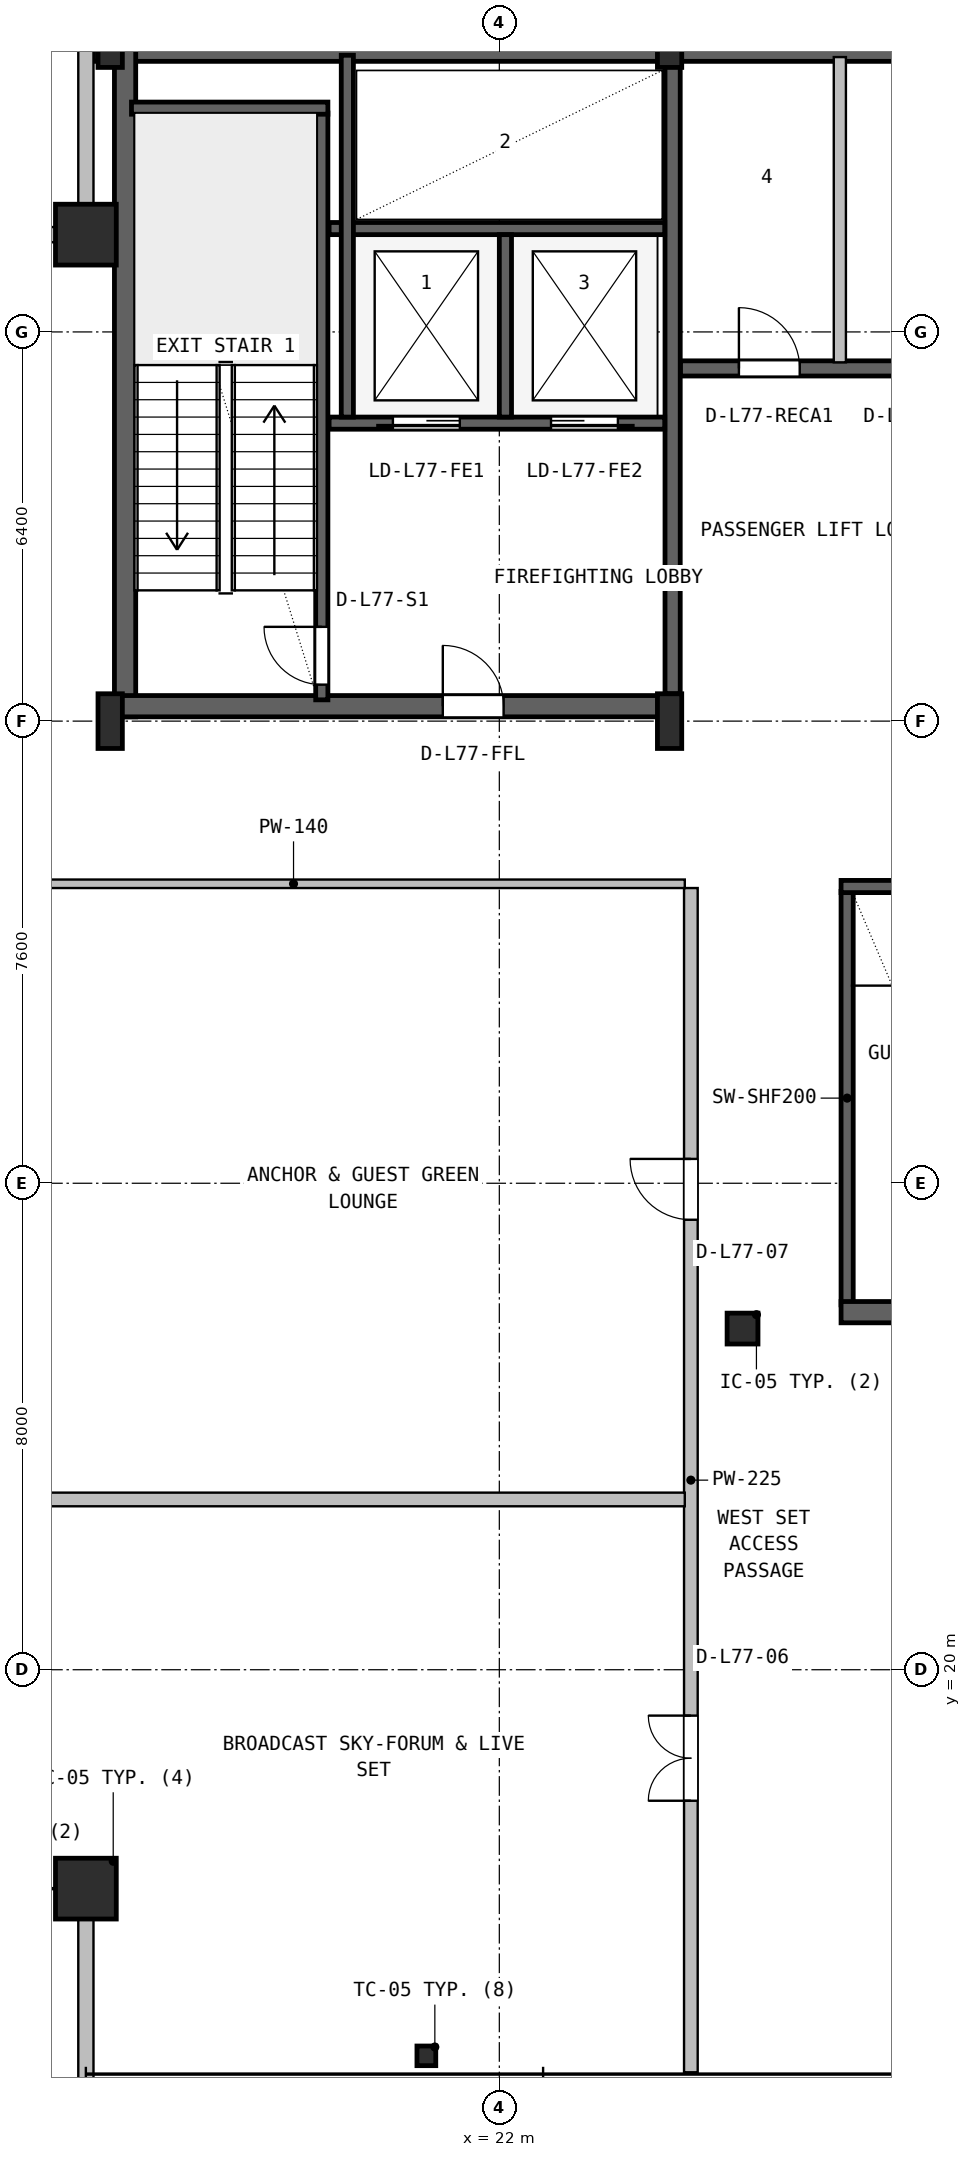
"""IFC4 building model, lengths in metres.
Left out: names, types, materials, properties, quantities, classifications, styles, units other than length and angle.
Written with IfcOpenShell. Run it as: python <this file> out.ifc"""

import sys

from ifc_helpers import new_model, si_unit, direction, frame, frame_2d, origin, origin_2d, place, context, subcontext, project, spatial, rectangle, hollow_rectangle, hollow_circle, i_section, extrude, source, transform, mapped, element, fill, save


model = new_model("IFC4")
c1 = context("Model", 3, precision=1e-05, world=origin(), true_north=direction((0.0, 1.0)))
c2 = subcontext(c1, "Body", "Model", "MODEL_VIEW")
j1 = project(units=[si_unit("LENGTHUNIT", "METRE"), si_unit("PLANEANGLEUNIT", "RADIAN")], contexts=[c1])
p1 = place(None, origin())
s1 = spatial("IfcSite", under=j1, at=p1, CompositionType="ELEMENT")
p2 = place(p1, origin())
s2 = spatial("IfcBuilding", under=s1, at=p2, CompositionType="ELEMENT")
p3 = place(p2, frame((0.0, 0.0, 309.8)))
s3 = spatial("IfcBuildingStorey", under=s2, at=p3, CompositionType="ELEMENT", Elevation=309.8)
p4 = place(p3, frame((15.325, 46.625, 0.0), z_axis=(0.0, 0.0, 1.0), x_axis=(1.0, 0.0, 0.0)))
e1 = element("IfcWall", 1, at=p4, inside=s3, PredefinedType="SHEAR", context=c2, shape_type="SweptSolid", body=[
    extrude(rectangle(XDim=37.35, YDim=0.35, at=frame_2d((18.675, 0.0))), origin(), (0.0, 0.0, 1.0), 4.48),
])
p5 = place(p3, frame((15.845, 35.67, 0.0), z_axis=(0.0, 0.0, 1.0), x_axis=(0.0, 1.0, 0.0)))
e2 = element("IfcWall", 2, at=p5, inside=s3, PredefinedType="SHEAR", context=c2, shape_type="SweptSolid", body=[
    extrude(rectangle(XDim=11.13, YDim=0.35, at=frame_2d((5.565, 0.0))), origin(), (0.0, 0.0, 1.0), 4.48),
])
p6 = place(p3, frame((15.67, 35.845, 0.0), z_axis=(0.0, 0.0, 1.0), x_axis=(1.0, 0.0, 0.0)))
e3 = element("IfcWall", 3, at=p6, inside=s3, PredefinedType="SHEAR", context=c2, shape_type="SweptSolid", body=[
    extrude(rectangle(XDim=9.13, YDim=0.35, at=frame_2d((4.565, 0.0))), origin(), (0.0, 0.0, 1.0), 4.48),
])
p7 = place(p6, frame((5.4, 0.0, 0.0)))
e4 = element("IfcOpeningElement", 4, at=p7, cuts=e3, PredefinedType="OPENING", context=c2, shape_type="SweptSolid", body=[
    extrude(rectangle(XDim=1.0, YDim=2.1, at=frame_2d((0.5, 1.05))), frame((0.0, 0.185, 0.0), z_axis=(0.0, -1.0, 0.0), x_axis=(1.0, 0.0, 0.0)), (0.0, 0.0, 1.0), 0.37),
])
m1 = source(origin(), c2, "Body", "SweptSolid", [
    extrude(i_section(OverallWidth=0.4, OverallDepth=0.9, WebThickness=0.016, FlangeThickness=0.028, FilletRadius=0.016, at=origin_2d()), origin(), (0.0, 0.0, 1.0), 4.8),
])
for number, where, z_axis, x_axis in (
    (5, (15.6, 35.6, 0.0), (0.0, 0.0, 1.0), (1.0, 0.0, 0.0)),
    (6, (15.6, 46.8, 0.0), (0.0, 0.0, 1.0), (1.0, 0.0, 0.0)),
    (7, (24.8, 35.6, 0.0), (0.0, 0.0, 1.0), (1.0, 0.0, 0.0)),
    (8, (24.8, 46.8, 0.0), (0.0, 0.0, 1.0), (1.0, 0.0, 0.0)),
):
    element("IfcColumn", number, at=place(p3, frame(where, z_axis=z_axis, x_axis=x_axis)), inside=s3, PredefinedType="COLUMN", context=c2, shape_type="MappedRepresentation", body=[
        mapped(m1, transform((0.0, 0.0, 0.0), x_axis=(1.0, 0.0, 0.0), y_axis=(0.0, 1.0, 0.0), z_axis=(0.0, 0.0, 1.0), scale=1.0)),
    ])
m2 = source(origin(), c2, "Body", "SweptSolid", [
    extrude(hollow_rectangle(XDim=1.0, YDim=1.0, WallThickness=0.04, at=origin_2d()), origin(), (0.0, 0.0, 1.0), 4.8),
])
for number, where, z_axis, x_axis in (
    (9, (15.2, 16.4, 0.0), (0.0, 0.0, 1.0), (1.0, 0.0, 0.0)),
    (10, (15.2, 43.6, 0.0), (0.0, 0.0, 1.0), (1.0, 0.0, 0.0)),
):
    element("IfcColumn", number, at=place(p3, frame(where, z_axis=z_axis, x_axis=x_axis)), inside=s3, PredefinedType="COLUMN", context=c2, shape_type="MappedRepresentation", body=[
        mapped(m2, transform((0.0, 0.0, 0.0), x_axis=(1.0, 0.0, 0.0), y_axis=(0.0, 1.0, 0.0), z_axis=(0.0, 0.0, 1.0), scale=1.0)),
    ])
m3 = source(origin(), c2, "Body", "SweptSolid", [
    extrude(i_section(OverallWidth=0.309, OverallDepth=0.323, WebThickness=0.014, FlangeThickness=0.023, FilletRadius=0.015, at=origin_2d()), origin(), (0.0, 0.0, 1.0), 4.8),
])
p8 = place(p3, frame((20.8, 13.65, 0.0), z_axis=(0.0, 0.0, 1.0), x_axis=(1.0, 0.0, 0.0)))
e11 = element("IfcColumn", 11, at=p8, inside=s3, PredefinedType="COLUMN", context=c2, shape_type="MappedRepresentation", body=[
    mapped(m3, transform((0.0, 0.0, 0.0), x_axis=(1.0, 0.0, 0.0), y_axis=(0.0, 1.0, 0.0), z_axis=(0.0, 0.0, 1.0), scale=1.0)),
])
m4 = source(origin(), c2, "Body", "SweptSolid", [
    extrude(hollow_circle(Radius=0.254, WallThickness=0.02, at=origin_2d()), origin(), (0.0, 0.0, 1.0), 4.8),
])
p9 = place(p3, frame((26.0, 25.61, 0.0), z_axis=(0.0, 0.0, 1.0), x_axis=(1.0, 0.0, 0.0)))
e12 = element("IfcColumn", 12, at=p9, inside=s3, PredefinedType="COLUMN", context=c2, shape_type="MappedRepresentation", body=[
    mapped(m4, transform((0.0, 0.0, 0.0), x_axis=(1.0, 0.0, 0.0), y_axis=(0.0, 1.0, 0.0), z_axis=(0.0, 0.0, 1.0), scale=1.0)),
])
p10 = place(p3, frame((15.2, 13.28, 0.0), z_axis=(0.0, 0.0, 1.0), x_axis=(0.0, 1.0, 0.0)))
e13 = element("IfcWall", 13, at=p10, inside=s3, PredefinedType="SOLIDWALL", context=c2, shape_type="SweptSolid", body=[
    extrude(rectangle(XDim=3.2, YDim=0.25, at=frame_2d((1.6, 0.0))), origin(), (0.0, 0.0, 1.0), 4.101),
])
p11 = place(p3, frame((12.08, 43.6, 0.0), z_axis=(0.0, 0.0, 1.0), x_axis=(1.0, 0.0, 0.0)))
e14 = element("IfcWall", 14, at=p11, inside=s3, PredefinedType="SOLIDWALL", context=c2, shape_type="SweptSolid", body=[
    extrude(rectangle(XDim=2.99, YDim=0.25, at=frame_2d((1.495, 0.0))), origin(), (0.0, 0.0, 1.0), 4.46),
])
p12 = place(p3, frame((15.2, 43.52, 0.0), z_axis=(0.0, 0.0, 1.0), x_axis=(0.0, 1.0, 0.0)))
e15 = element("IfcWall", 15, at=p12, inside=s3, PredefinedType="SOLIDWALL", context=c2, shape_type="SweptSolid", body=[
    extrude(rectangle(XDim=3.2, YDim=0.25, at=frame_2d((1.6, 0.0))), origin(), (0.0, 0.0, 1.0), 4.101),
])
p13 = place(p3, frame((19.08, 35.95, 0.0), z_axis=(0.0, 0.0, 1.0), x_axis=(0.0, 1.0, 0.0)))
e16 = element("IfcWall", 16, at=p13, inside=s3, PredefinedType="SHEAR", context=c2, shape_type="SweptSolid", body=[
    extrude(rectangle(XDim=9.65, YDim=0.2, at=frame_2d((4.825, 0.0))), origin(), (0.0, 0.0, 1.0), 4.48),
])
p14 = place(p13, frame((0.25, 0.0, 0.0)))
e17 = element("IfcOpeningElement", 17, at=p14, cuts=e16, PredefinedType="OPENING", context=c2, shape_type="SweptSolid", body=[
    extrude(rectangle(XDim=0.95, YDim=2.1, at=frame_2d((0.475, 1.05))), frame((0.0, 0.11, 0.0), z_axis=(0.0, -1.0, 0.0), x_axis=(1.0, 0.0, 0.0)), (0.0, 0.0, 1.0), 0.22),
])
p15 = place(p3, frame((15.95, 45.68, 0.0), z_axis=(0.0, 0.0, 1.0), x_axis=(1.0, 0.0, 0.0)))
e18 = element("IfcWall", 18, at=p15, inside=s3, PredefinedType="SHEAR", context=c2, shape_type="SweptSolid", body=[
    extrude(rectangle(XDim=3.23, YDim=0.2, at=frame_2d((1.615, 0.0))), origin(), (0.0, 0.0, 1.0), 4.48),
])
p16 = place(p3, frame((24.85, 36.05, 0.0), z_axis=(0.0, 0.0, 1.0), x_axis=(0.0, 1.0, 0.0)))
e19 = element("IfcWall", 19, at=p16, inside=s3, PredefinedType="SHEAR", context=c2, shape_type="SweptSolid", body=[
    extrude(rectangle(XDim=10.45, YDim=0.25, at=frame_2d((5.225, 0.0))), origin(), (0.0, 0.0, 1.0), 4.48),
])
p17 = place(p3, frame((19.2, 40.5, 0.0), z_axis=(0.0, 0.0, 1.0), x_axis=(1.0, 0.0, 0.0)))
e20 = element("IfcWall", 20, at=p17, inside=s3, PredefinedType="SHEAR", context=c2, shape_type="SweptSolid", body=[
    extrude(rectangle(XDim=5.52, YDim=0.2, at=frame_2d((2.76, 0.0))), origin(), (0.0, 0.0, 1.0), 4.48),
])
p18 = place(p17, frame((1.05, 0.0, 0.0)))
e21 = element("IfcOpeningElement", 21, at=p18, cuts=e20, PredefinedType="OPENING", context=c2, shape_type="SweptSolid", body=[
    extrude(rectangle(XDim=1.1, YDim=2.18, at=frame_2d((0.55, 1.09))), frame((0.0, 0.11, 0.0), z_axis=(0.0, -1.0, 0.0), x_axis=(1.0, 0.0, 0.0)), (0.0, 0.0, 1.0), 0.22),
])
p19 = place(p17, frame((3.65, 0.0, 0.0)))
e22 = element("IfcOpeningElement", 22, at=p19, cuts=e20, PredefinedType="OPENING", context=c2, shape_type="SweptSolid", body=[
    extrude(rectangle(XDim=1.1, YDim=2.18, at=frame_2d((0.55, 1.09))), frame((0.0, 0.11, 0.0), z_axis=(0.0, -1.0, 0.0), x_axis=(1.0, 0.0, 0.0)), (0.0, 0.0, 1.0), 0.22),
])
p20 = place(p3, frame((19.2, 43.7, 0.0), z_axis=(0.0, 0.0, 1.0), x_axis=(1.0, 0.0, 0.0)))
e23 = element("IfcWall", 23, at=p20, inside=s3, PredefinedType="SHEAR", context=c2, shape_type="SweptSolid", body=[
    extrude(rectangle(XDim=5.52, YDim=0.2, at=frame_2d((2.76, 0.0))), origin(), (0.0, 0.0, 1.0), 4.48),
])
p21 = place(p3, frame((22.1, 40.6, 0.0), z_axis=(0.0, 0.0, 1.0), x_axis=(0.0, 1.0, 0.0)))
e24 = element("IfcWall", 24, at=p21, inside=s3, PredefinedType="SHEAR", context=c2, shape_type="SweptSolid", body=[
    extrude(rectangle(XDim=3.0, YDim=0.2, at=frame_2d((1.5, 0.0))), origin(), (0.0, 0.0, 1.0), 4.48),
])
p22 = place(p3, frame((19.5, 40.6, 0.0), z_axis=(0.0, 0.0, 1.0), x_axis=(0.0, 1.0, 0.0)))
e25 = element("IfcWall", 25, at=p22, inside=s3, PredefinedType="SHEAR", context=c2, shape_type="SweptSolid", body=[
    extrude(rectangle(XDim=5.95, YDim=0.2, at=frame_2d((2.975, 0.0))), origin(), (0.0, 0.0, 1.0), 4.48),
])
p23 = place(p3, frame((24.98, 41.4, 0.0), z_axis=(0.0, 0.0, 1.0), x_axis=(1.0, 0.0, 0.0)))
e26 = element("IfcWall", 26, at=p23, inside=s3, PredefinedType="SHEAR", context=c2, shape_type="SweptSolid", body=[
    extrude(rectangle(XDim=23.82, YDim=0.25, at=frame_2d((11.91, 0.0))), origin(), (0.0, 0.0, 1.0), 4.48),
])
p24 = place(p23, frame((0.96, 0.0, 0.0)))
e27 = element("IfcOpeningElement", 27, at=p24, cuts=e26, PredefinedType="OPENING", context=c2, shape_type="SweptSolid", body=[
    extrude(rectangle(XDim=1.0, YDim=2.08, at=frame_2d((0.5, 1.04))), frame((0.0, 0.135, 0.0), z_axis=(0.0, -1.0, 0.0), x_axis=(1.0, 0.0, 0.0)), (0.0, 0.0, 1.0), 0.27),
])
p25 = place(p23, frame((3.56, 0.0, 0.0)))
e28 = element("IfcOpeningElement", 28, at=p25, cuts=e26, PredefinedType="OPENING", context=c2, shape_type="SweptSolid", body=[
    extrude(rectangle(XDim=1.0, YDim=2.08, at=frame_2d((0.5, 1.04))), frame((0.0, 0.135, 0.0), z_axis=(0.0, -1.0, 0.0), x_axis=(1.0, 0.0, 0.0)), (0.0, 0.0, 1.0), 0.27),
])
p26 = place(p23, frame((6.16, 0.0, 0.0)))
e29 = element("IfcOpeningElement", 29, at=p26, cuts=e26, PredefinedType="OPENING", context=c2, shape_type="SweptSolid", body=[
    extrude(rectangle(XDim=0.92, YDim=2.08, at=frame_2d((0.46, 1.04))), frame((0.0, 0.135, 0.0), z_axis=(0.0, -1.0, 0.0), x_axis=(1.0, 0.0, 0.0)), (0.0, 0.0, 1.0), 0.27),
])
p27 = place(p23, frame((11.56, 0.0, 0.0)))
e30 = element("IfcOpeningElement", 30, at=p27, cuts=e26, PredefinedType="OPENING", context=c2, shape_type="SweptSolid", body=[
    extrude(rectangle(XDim=1.0, YDim=2.08, at=frame_2d((0.5, 1.04))), frame((0.0, 0.135, 0.0), z_axis=(0.0, -1.0, 0.0), x_axis=(1.0, 0.0, 0.0)), (0.0, 0.0, 1.0), 0.27),
])
p28 = place(p23, frame((19.56, 0.0, 0.0)))
e31 = element("IfcOpeningElement", 31, at=p28, cuts=e26, PredefinedType="OPENING", context=c2, shape_type="SweptSolid", body=[
    extrude(rectangle(XDim=0.92, YDim=2.08, at=frame_2d((0.46, 1.04))), frame((0.0, 0.135, 0.0), z_axis=(0.0, -1.0, 0.0), x_axis=(1.0, 0.0, 0.0)), (0.0, 0.0, 1.0), 0.27),
])
p29 = place(p3, frame((27.72, 26.0, 0.0), z_axis=(0.0, 0.0, 1.0), x_axis=(0.0, 1.0, 0.0)))
e32 = element("IfcWall", 32, at=p29, inside=s3, PredefinedType="SHEAR", context=c2, shape_type="SweptSolid", body=[
    extrude(rectangle(XDim=6.8, YDim=0.2, at=frame_2d((3.4, 0.0))), origin(), (0.0, 0.0, 1.0), 4.48),
])
p30 = place(p3, frame((27.62, 25.88, 0.0), z_axis=(0.0, 0.0, 1.0), x_axis=(1.0, 0.0, 0.0)))
e33 = element("IfcWall", 33, at=p30, inside=s3, PredefinedType="SHEAR", context=c2, shape_type="SweptSolid", body=[
    extrude(rectangle(XDim=3.26, YDim=0.35, at=frame_2d((1.63, 0.0))), origin(), (0.0, 0.0, 1.0), 4.48),
])
p31 = place(p3, frame((27.62, 32.88, 0.0), z_axis=(0.0, 0.0, 1.0), x_axis=(1.0, 0.0, 0.0)))
e34 = element("IfcWall", 34, at=p31, inside=s3, PredefinedType="SHEAR", context=c2, shape_type="SweptSolid", body=[
    extrude(rectangle(XDim=3.26, YDim=0.2, at=frame_2d((1.63, 0.0))), origin(), (0.0, 0.0, 1.0), 4.48),
])
p32 = place(p31, frame((1.15, 0.0, 0.0)))
e35 = element("IfcOpeningElement", 35, at=p32, cuts=e34, PredefinedType="OPENING", context=c2, shape_type="SweptSolid", body=[
    extrude(rectangle(XDim=0.95, YDim=2.1, at=frame_2d((0.475, 1.05))), frame((0.0, 0.11, 0.0), z_axis=(0.0, -1.0, 0.0), x_axis=(1.0, 0.0, 0.0)), (0.0, 0.0, 1.0), 0.22),
])
p33 = place(p3, frame((25.15, 13.38, 0.0), z_axis=(0.0, 0.0, 1.0), x_axis=(0.0, 1.0, 0.0)))
e36 = element("IfcWall", 36, at=p33, inside=s3, PredefinedType="PARTITIONING", context=c2, shape_type="SweptSolid", body=[
    extrude(rectangle(XDim=19.475, YDim=0.225, at=frame_2d((9.738, 0.0))), origin(), (0.0, 0.0, 1.0), 3.911),
])
p34 = place(p33, frame((4.465, 0.0, 0.0)))
e37 = element("IfcOpeningElement", 37, at=p34, cuts=e36, PredefinedType="OPENING", context=c2, shape_type="SweptSolid", body=[
    extrude(rectangle(XDim=1.4, YDim=2.12, at=frame_2d((0.7, 1.06))), frame((0.0, 0.123, 0.0), z_axis=(0.0, -1.0, 0.0), x_axis=(1.0, 0.0, 0.0)), (0.0, 0.0, 1.0), 0.245),
])
p35 = place(p33, frame((14.02, 0.0, 0.0)))
e38 = element("IfcOpeningElement", 38, at=p35, cuts=e36, PredefinedType="OPENING", context=c2, shape_type="SweptSolid", body=[
    extrude(rectangle(XDim=1.0, YDim=2.1, at=frame_2d((0.5, 1.05))), frame((0.0, 0.123, 0.0), z_axis=(0.0, -1.0, 0.0), x_axis=(1.0, 0.0, 0.0)), (0.0, 0.0, 1.0), 0.245),
])
p36 = place(p3, frame((12.18, 22.8, 0.0), z_axis=(0.0, 0.0, 1.0), x_axis=(1.0, 0.0, 0.0)))
e39 = element("IfcWall", 39, at=p36, inside=s3, PredefinedType="PARTITIONING", context=c2, shape_type="SweptSolid", body=[
    extrude(rectangle(XDim=12.87, YDim=0.225, at=frame_2d((6.435, 0.0))), origin(), (0.0, 0.0, 1.0), 4.101),
])
p37 = place(p3, frame((12.18, 32.925, 0.0), z_axis=(0.0, 0.0, 1.0), x_axis=(1.0, 0.0, 0.0)))
e40 = element("IfcWall", 40, at=p37, inside=s3, PredefinedType="PARTITIONING", context=c2, shape_type="SweptSolid", body=[
    extrude(rectangle(XDim=12.87, YDim=0.14, at=frame_2d((6.435, 0.0))), origin(), (0.0, 0.0, 1.0), 3.911),
])
p38 = place(p3, frame((27.6, 41.5, 0.0), z_axis=(0.0, 0.0, 1.0), x_axis=(0.0, 1.0, 0.0)))
e41 = element("IfcWall", 41, at=p38, inside=s3, PredefinedType="SOLIDWALL", context=c2, shape_type="SweptSolid", body=[
    extrude(rectangle(XDim=5.02, YDim=0.2, at=frame_2d((2.51, 0.0))), origin(), (0.0, 0.0, 1.0), 4.46),
])
m5 = source(origin(), c2, "Body", "SweptSolid", [
    extrude(rectangle(XDim=0.95, YDim=2.1, at=frame_2d((0.475, 1.05))), frame((0.0, 0.025, 0.0), z_axis=(0.0, -1.0, 0.0), x_axis=(1.0, 0.0, 0.0)), (0.0, 0.0, 1.0), 0.05),
])
p39 = place(p14, origin())
e42 = element("IfcDoor", 42, at=p39, inside=s3, OperationType="SINGLE_SWING_RIGHT", PredefinedType="DOOR", context=c2, shape_type="MappedRepresentation", body=[
    mapped(m5, transform((0.0, 0.0, 0.0), x_axis=(1.0, 0.0, 0.0), y_axis=(0.0, 1.0, 0.0), z_axis=(0.0, 0.0, 1.0), scale=1.0)),
])
fill(e17, e42)
m6 = source(origin(), c2, "Body", "SweptSolid", [
    extrude(rectangle(XDim=1.0, YDim=2.1, at=frame_2d((0.5, 1.05))), frame((0.0, 0.025, 0.0), z_axis=(0.0, -1.0, 0.0), x_axis=(1.0, 0.0, 0.0)), (0.0, 0.0, 1.0), 0.05),
])
p40 = place(p7, origin())
e43 = element("IfcDoor", 43, at=p40, inside=s3, OperationType="SINGLE_SWING_LEFT", PredefinedType="DOOR", context=c2, shape_type="MappedRepresentation", body=[
    mapped(m6, transform((0.0, 0.0, 0.0), x_axis=(1.0, 0.0, 0.0), y_axis=(0.0, 1.0, 0.0), z_axis=(0.0, 0.0, 1.0), scale=1.0)),
])
fill(e4, e43)
m7 = source(origin(), c2, "Body", "SweptSolid", [
    extrude(rectangle(XDim=1.1, YDim=2.18, at=frame_2d((0.55, 1.09))), frame((0.0, 0.025, 0.0), z_axis=(0.0, -1.0, 0.0), x_axis=(1.0, 0.0, 0.0)), (0.0, 0.0, 1.0), 0.05),
])
p41 = place(p18, frame((1.1, 0.0, 0.0), z_axis=(0.0, 0.0, 1.0), x_axis=(-1.0, 0.0, 0.0)))
e44 = element("IfcDoor", 44, at=p41, inside=s3, OperationType="SLIDING_TO_LEFT", PredefinedType="DOOR", context=c2, shape_type="MappedRepresentation", body=[
    mapped(m7, transform((0.0, 0.0, 0.0), x_axis=(1.0, 0.0, 0.0), y_axis=(0.0, 1.0, 0.0), z_axis=(0.0, 0.0, 1.0), scale=1.0)),
])
fill(e21, e44)
p42 = place(p19, frame((1.1, 0.0, 0.0), z_axis=(0.0, 0.0, 1.0), x_axis=(-1.0, 0.0, 0.0)))
e45 = element("IfcDoor", 45, at=p42, inside=s3, OperationType="SLIDING_TO_RIGHT", PredefinedType="DOOR", context=c2, shape_type="MappedRepresentation", body=[
    mapped(m7, transform((0.0, 0.0, 0.0), x_axis=(1.0, 0.0, 0.0), y_axis=(0.0, 1.0, 0.0), z_axis=(0.0, 0.0, 1.0), scale=1.0)),
])
fill(e22, e45)
m8 = source(origin(), c2, "Body", "SweptSolid", [
    extrude(rectangle(XDim=1.0, YDim=2.08, at=frame_2d((0.5, 1.04))), frame((0.0, 0.025, 0.0), z_axis=(0.0, -1.0, 0.0), x_axis=(1.0, 0.0, 0.0)), (0.0, 0.0, 1.0), 0.05),
])
p43 = place(p24, origin())
e46 = element("IfcDoor", 46, at=p43, inside=s3, OperationType="SINGLE_SWING_LEFT", PredefinedType="DOOR", context=c2, shape_type="MappedRepresentation", body=[
    mapped(m8, transform((0.0, 0.0, 0.0), x_axis=(1.0, 0.0, 0.0), y_axis=(0.0, 1.0, 0.0), z_axis=(0.0, 0.0, 1.0), scale=1.0)),
])
fill(e27, e46)
m9 = source(origin(), c2, "Body", "SweptSolid", [
    extrude(rectangle(XDim=1.4, YDim=2.12, at=frame_2d((0.7, 1.06))), frame((0.0, 0.025, 0.0), z_axis=(0.0, -1.0, 0.0), x_axis=(1.0, 0.0, 0.0)), (0.0, 0.0, 1.0), 0.05),
])
p44 = place(p34, origin())
e47 = element("IfcDoor", 47, at=p44, inside=s3, OperationType="DOUBLE_DOOR_SINGLE_SWING", PredefinedType="DOOR", context=c2, shape_type="MappedRepresentation", body=[
    mapped(m9, transform((0.0, 0.0, 0.0), x_axis=(1.0, 0.0, 0.0), y_axis=(0.0, 1.0, 0.0), z_axis=(0.0, 0.0, 1.0), scale=1.0)),
])
fill(e37, e47)
m10 = source(origin(), c2, "Body", "SweptSolid", [
    extrude(rectangle(XDim=1.0, YDim=2.1, at=frame_2d((0.5, 1.05))), frame((0.0, 0.025, 0.0), z_axis=(0.0, -1.0, 0.0), x_axis=(1.0, 0.0, 0.0)), (0.0, 0.0, 1.0), 0.05),
])
p45 = place(p35, origin())
e48 = element("IfcDoor", 48, at=p45, inside=s3, OperationType="SINGLE_SWING_RIGHT", PredefinedType="DOOR", context=c2, shape_type="MappedRepresentation", body=[
    mapped(m10, transform((0.0, 0.0, 0.0), x_axis=(1.0, 0.0, 0.0), y_axis=(0.0, 1.0, 0.0), z_axis=(0.0, 0.0, 1.0), scale=1.0)),
])
fill(e38, e48)
save(model, sys.argv[1])
